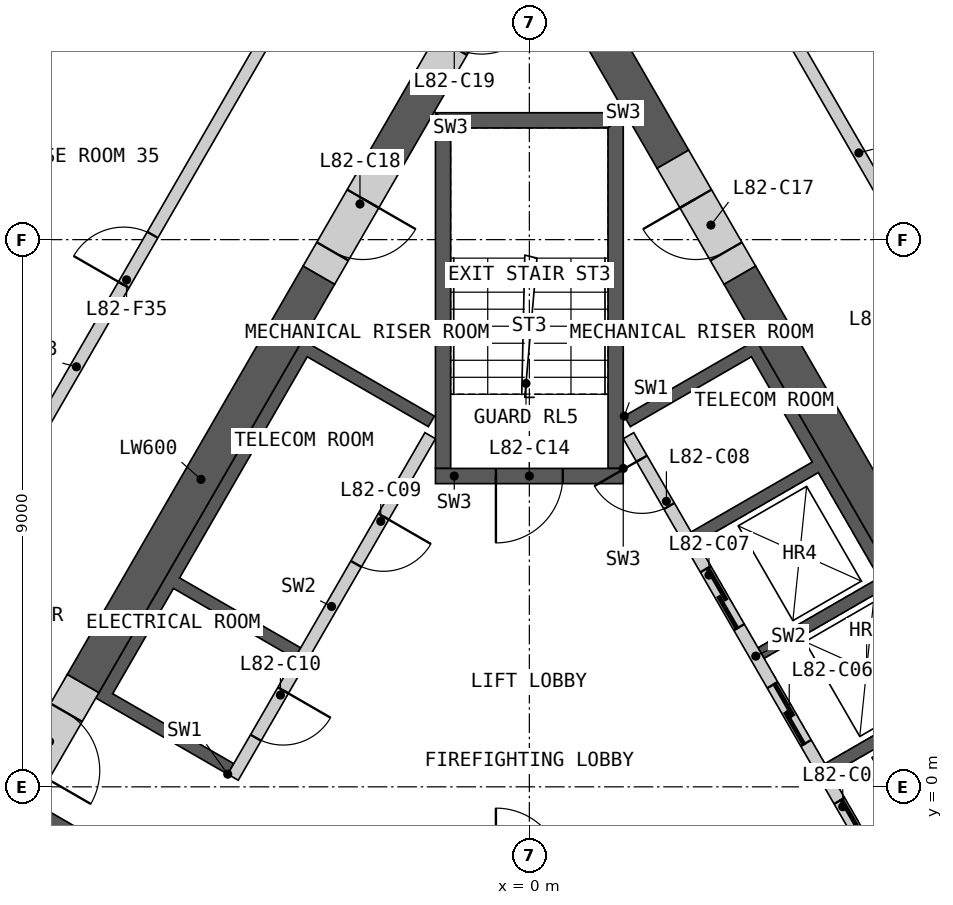
"""IFC4 building model, lengths in metres.
Left out: names, types, materials, properties, quantities, classifications, styles, units other than length and angle.
Written with IfcOpenShell. Run it as: python <this file> out.ifc"""

import sys

from ifc_helpers import new_model, si_unit, direction, frame, frame_2d, origin, place, context, subcontext, project, spatial, polyline, rectangle, outline, extrude, element, fill, save


model = new_model("IFC4")
c1 = context("Model", 3, precision=1e-05, world=origin(), true_north=direction((0.0, 1.0)))
c2 = subcontext(c1, "Body", "Model", "MODEL_VIEW")
j1 = project(units=[si_unit("LENGTHUNIT", "METRE"), si_unit("PLANEANGLEUNIT", "RADIAN")], contexts=[c1])
p1 = place(None, origin())
s1 = spatial("IfcSite", under=j1, at=p1, CompositionType="ELEMENT")
p2 = place(p1, origin())
s2 = spatial("IfcBuilding", under=s1, at=p2, CompositionType="ELEMENT")
p3 = place(p2, frame((0.0, 0.0, 367.8)))
s3 = spatial("IfcBuildingStorey", under=s2, at=p3, CompositionType="ELEMENT", Elevation=367.8)
p4 = place(p3, origin())
e1 = element("IfcWall", 1, at=p4, inside=s3, PredefinedType="SHEAR", context=c2, shape_type="SweptSolid", body=[
    extrude(outline(polyline([(1.561, 6.097), (3.731, 7.35), (8.231, -0.444), (6.061, -1.697), (5.96, -1.524), (7.952, -0.374), (6.952, 1.358), (4.96, 0.208), (4.861, 0.381), (6.852, 1.531), (5.852, 3.263), (3.861, 2.113), (3.76, 2.287), (5.752, 3.437), (4.752, 5.169), (2.76, 4.019), (2.66, 4.192), (4.652, 5.342), (3.652, 7.074), (1.66, 5.924), (1.561, 6.097)])), origin(), (0.0, 0.0, 1.0), 3.1),
])
p5 = place(p3, frame((5.817, -1.476, 0.0), z_axis=(0.0, 0.0, 1.0), x_axis=(-0.500002616675, 0.866023893041, 0.0)))
e2 = element("IfcWall", 2, at=p5, inside=s3, PredefinedType="SOLIDWALL", context=c2, shape_type="SweptSolid", body=[
    extrude(rectangle(XDim=8.373, YDim=0.2, at=frame_2d((4.187, 0.0))), origin(), (0.0, 0.0, 1.0), 3.1),
])
p6 = place(p5, frame((0.337, 0.0, 0.0)))
e3 = element("IfcOpeningElement", 3, at=p6, cuts=e2, PredefinedType="OPENING", context=c2, shape_type="SweptSolid", body=[
    extrude(rectangle(XDim=1.1, YDim=2.1, at=frame_2d((0.55, 1.05))), frame((0.0, 0.11, 0.0), z_axis=(0.0, -1.0, 0.0), x_axis=(1.0, 0.0, 0.0)), (0.0, 0.0, 1.0), 0.22),
])
p7 = place(p5, frame((2.537, 0.0, 0.0)))
e4 = element("IfcOpeningElement", 4, at=p7, cuts=e2, PredefinedType="OPENING", context=c2, shape_type="SweptSolid", body=[
    extrude(rectangle(XDim=1.1, YDim=2.1, at=frame_2d((0.55, 1.05))), frame((0.0, 0.11, 0.0), z_axis=(0.0, -1.0, 0.0), x_axis=(1.0, 0.0, 0.0)), (0.0, 0.0, 1.0), 0.22),
])
p8 = place(p5, frame((4.737, 0.0, 0.0)))
e5 = element("IfcOpeningElement", 5, at=p8, cuts=e2, PredefinedType="OPENING", context=c2, shape_type="SweptSolid", body=[
    extrude(rectangle(XDim=1.1, YDim=2.1, at=frame_2d((0.55, 1.05))), frame((0.0, 0.11, 0.0), z_axis=(0.0, -1.0, 0.0), x_axis=(1.0, 0.0, 0.0)), (0.0, 0.0, 1.0), 0.22),
])
p9 = place(p5, frame((7.037, 0.0, 0.0)))
e6 = element("IfcOpeningElement", 6, at=p9, cuts=e2, PredefinedType="OPENING", context=c2, shape_type="SweptSolid", body=[
    extrude(rectangle(XDim=0.9, YDim=2.1, at=frame_2d((0.45, 1.05))), frame((0.0, 0.11, 0.0), z_axis=(0.0, -1.0, 0.0), x_axis=(1.0, 0.0, 0.0)), (0.0, 0.0, 1.0), 0.22),
])
p10 = place(p3, origin())
e7 = element("IfcWall", 7, at=p10, inside=s3, PredefinedType="SHEAR", context=c2, shape_type="SweptSolid", body=[
    extrude(outline(polyline([(-6.061, -1.697), (-8.231, -0.444), (-8.131, -0.271), (-5.96, -1.524), (-6.061, -1.697)])), origin(), (0.0, 0.0, 1.0), 3.1),
])
p11 = place(p3, origin())
e8 = element("IfcWall", 8, at=p11, inside=s3, PredefinedType="SHEAR", context=c2, shape_type="SweptSolid", body=[
    extrude(outline(polyline([(-4.96, 0.208), (-7.131, 1.461), (-3.731, 7.35), (-1.561, 6.097), (-1.66, 5.924), (-3.652, 7.074), (-5.752, 3.437), (-3.76, 2.287), (-3.861, 2.113), (-5.852, 3.263), (-6.852, 1.531), (-4.861, 0.381), (-4.96, 0.208)])), origin(), (0.0, 0.0, 1.0), 3.1),
])
p12 = place(p3, frame((-1.631, 5.776, 0.0), z_axis=(0.0, 0.0, 1.0), x_axis=(-0.499992876559, -0.866029516466, 0.0)))
e9 = element("IfcWall", 9, at=p12, inside=s3, PredefinedType="SOLIDWALL", context=c2, shape_type="SweptSolid", body=[
    extrude(rectangle(XDim=6.486, YDim=0.2, at=frame_2d((3.243, 0.0))), origin(), (0.0, 0.0, 1.0), 3.1),
])
p13 = place(p12, frame((1.537, 0.0, 0.0)))
e10 = element("IfcOpeningElement", 10, at=p13, cuts=e9, PredefinedType="OPENING", context=c2, shape_type="SweptSolid", body=[
    extrude(rectangle(XDim=0.9, YDim=2.1, at=frame_2d((0.45, 1.05))), frame((0.0, 0.11, 0.0), z_axis=(0.0, -1.0, 0.0), x_axis=(1.0, 0.0, 0.0)), (0.0, 0.0, 1.0), 0.22),
])
p14 = place(p12, frame((4.837, 0.0, 0.0)))
e11 = element("IfcOpeningElement", 11, at=p14, cuts=e9, PredefinedType="OPENING", context=c2, shape_type="SweptSolid", body=[
    extrude(rectangle(XDim=0.9, YDim=2.1, at=frame_2d((0.45, 1.05))), frame((0.0, 0.11, 0.0), z_axis=(0.0, -1.0, 0.0), x_axis=(1.0, 0.0, 0.0)), (0.0, 0.0, 1.0), 0.22),
])
p15 = place(p3, origin())
e12 = element("IfcWall", 12, at=p15, inside=s3, PredefinedType="SHEAR", context=c2, shape_type="SweptSolid", body=[
    extrude(outline(polyline([(1.544, 5.237), (1.544, 11.087), (1.294, 10.837), (1.294, 5.237), (1.544, 5.237)])), origin(), (0.0, 0.0, 1.0), 3.1),
])
p16 = place(p3, origin())
e13 = element("IfcWall", 13, at=p16, inside=s3, PredefinedType="SHEAR", context=c2, shape_type="SweptSolid", body=[
    extrude(outline(polyline([(1.544, 11.087), (-1.544, 11.087), (-1.294, 10.837), (1.294, 10.837), (1.544, 11.087)])), origin(), (0.0, 0.0, 1.0), 3.1),
])
p17 = place(p3, origin())
e14 = element("IfcWall", 14, at=p17, inside=s3, PredefinedType="SHEAR", context=c2, shape_type="SweptSolid", body=[
    extrude(outline(polyline([(-1.294, 10.837), (-1.544, 11.087), (-1.544, 5.237), (-1.294, 5.237), (-1.294, 10.837)])), origin(), (0.0, 0.0, 1.0), 3.1),
])
p18 = place(p3, frame((1.544, 5.112, 0.0), z_axis=(0.0, 0.0, 1.0), x_axis=(-1.0, 0.0, 0.0)))
e15 = element("IfcWall", 15, at=p18, inside=s3, PredefinedType="SHEAR", context=c2, shape_type="SweptSolid", body=[
    extrude(rectangle(XDim=3.088, YDim=0.25, at=frame_2d((1.544, 0.0))), origin(), (0.0, 0.0, 1.0), 3.1),
])
p19 = place(p18, frame((0.994, 0.0, 0.0)))
e16 = element("IfcOpeningElement", 16, at=p19, cuts=e15, PredefinedType="OPENING", context=c2, shape_type="SweptSolid", body=[
    extrude(rectangle(XDim=1.1, YDim=2.1, at=frame_2d((0.55, 1.05))), frame((0.0, 0.135, 0.0), z_axis=(0.0, -1.0, 0.0), x_axis=(1.0, 0.0, 0.0)), (0.0, 0.0, 1.0), 0.27),
])
p20 = place(p3, frame((8.686, -0.634, 0.0), z_axis=(0.0, 0.0, 1.0), x_axis=(-0.50001836461, 0.866014800712, 0.0)))
e17 = element("IfcWall", 17, at=p20, inside=s3, PredefinedType="SHEAR", context=c2, shape_type="SweptSolid", body=[
    extrude(rectangle(XDim=10.451, YDim=0.6, at=frame_2d((5.225, 0.0))), origin(), (0.0, 0.0, 1.0), 3.1),
])
p21 = place(p3, frame((2.361, 10.322, 0.0), z_axis=(0.0, 0.0, 1.0), x_axis=(-0.500000735859, 0.866024978935, 0.0)))
e18 = element("IfcWall", 18, at=p21, inside=s3, PredefinedType="SHEAR", context=c2, shape_type="SweptSolid", body=[
    extrude(rectangle(XDim=4.202, YDim=0.6, at=frame_2d((2.101, 0.0))), origin(), (0.0, 0.0, 1.0), 3.1),
])
p22 = place(p3, frame((-3.461, 8.417, 0.0), z_axis=(0.0, 0.0, 1.0), x_axis=(-0.50000391502, -0.866023143435, 0.0)))
e19 = element("IfcWall", 19, at=p22, inside=s3, PredefinedType="SHEAR", context=c2, shape_type="SweptSolid", body=[
    extrude(rectangle(XDim=7.759, YDim=0.6, at=frame_2d((3.879, 0.0))), origin(), (0.0, 0.0, 1.0), 3.1),
])
p23 = place(p3, frame((-1.59, 11.658, 0.0), z_axis=(0.0, 0.0, 1.0), x_axis=(-0.500037594623, -0.866003697431, 0.0)))
e20 = element("IfcWall", 20, at=p23, inside=s3, PredefinedType="SHEAR", context=c2, shape_type="SweptSolid", body=[
    extrude(rectangle(XDim=1.542, YDim=0.6, at=frame_2d((0.771, 0.0))), origin(), (0.0, 0.0, 1.0), 3.1),
])
p24 = place(p3, frame((3.461, 8.417, 0.0), z_axis=(0.0, 0.0, 1.0), x_axis=(-0.499946605688, 0.86605622881, 0.0)))
e21 = element("IfcWall", 21, at=p24, inside=s3, PredefinedType="SHEAR", context=c2, shape_type="SweptSolid", body=[
    extrude(rectangle(XDim=2.2, YDim=0.6, at=frame_2d((1.1, 0.0))), origin(), (0.0, 0.0, 1.0), 3.1),
])
p25 = place(p24, frame((0.45, 0.0, 0.0)))
e22 = element("IfcOpeningElement", 22, at=p25, cuts=e21, PredefinedType="OPENING", context=c2, shape_type="SweptSolid", body=[
    extrude(rectangle(XDim=1.0, YDim=2.1, at=frame_2d((0.5, 1.05))), frame((0.0, 0.31, 0.0), z_axis=(0.0, -1.0, 0.0), x_axis=(1.0, 0.0, 0.0)), (0.0, 0.0, 1.0), 0.62),
])
p26 = place(p3, frame((-2.361, 10.322, 0.0), z_axis=(0.0, 0.0, 1.0), x_axis=(-0.499946605688, -0.86605622881, 0.0)))
e23 = element("IfcWall", 23, at=p26, inside=s3, PredefinedType="SHEAR", context=c2, shape_type="SweptSolid", body=[
    extrude(rectangle(XDim=2.2, YDim=0.6, at=frame_2d((1.1, 0.0))), origin(), (0.0, 0.0, 1.0), 3.1),
])
p27 = place(p26, frame((0.75, 0.0, 0.0)))
e24 = element("IfcOpeningElement", 24, at=p27, cuts=e23, PredefinedType="OPENING", context=c2, shape_type="SweptSolid", body=[
    extrude(rectangle(XDim=1.0, YDim=2.1, at=frame_2d((0.5, 1.05))), frame((0.0, 0.31, 0.0), z_axis=(0.0, -1.0, 0.0), x_axis=(1.0, 0.0, 0.0)), (0.0, 0.0, 1.0), 0.62),
])
p28 = place(p3, frame((-0.26, 13.961, 0.0), z_axis=(0.0, 0.0, 1.0), x_axis=(-0.49997936161, -0.866037319036, 0.0)))
e25 = element("IfcWall", 25, at=p28, inside=s3, PredefinedType="SHEAR", context=c2, shape_type="SweptSolid", body=[
    extrude(rectangle(XDim=2.66, YDim=0.6, at=frame_2d((1.33, 0.0))), origin(), (0.0, 0.0, 1.0), 3.1),
])
p29 = place(p28, frame((1.05, 0.0, 0.0)))
e26 = element("IfcOpeningElement", 26, at=p29, cuts=e25, PredefinedType="OPENING", context=c2, shape_type="SweptSolid", body=[
    extrude(rectangle(XDim=1.0, YDim=2.1, at=frame_2d((0.5, 1.05))), frame((0.0, 0.31, 0.0), z_axis=(0.0, -1.0, 0.0), x_axis=(1.0, 0.0, 0.0)), (0.0, 0.0, 1.0), 0.62),
])
p30 = place(p3, frame((-7.34, 1.698, 0.0), z_axis=(0.0, 0.0, 1.0), x_axis=(-0.50002983664, -0.866008176907, 0.0)))
e27 = element("IfcWall", 27, at=p30, inside=s3, PredefinedType="SHEAR", context=c2, shape_type="SweptSolid", body=[
    extrude(rectangle(XDim=2.2, YDim=0.6, at=frame_2d((1.1, 0.0))), origin(), (0.0, 0.0, 1.0), 3.1),
])
p31 = place(p30, frame((0.55, 0.0, 0.0)))
e28 = element("IfcOpeningElement", 28, at=p31, cuts=e27, PredefinedType="OPENING", context=c2, shape_type="SweptSolid", body=[
    extrude(rectangle(XDim=1.1, YDim=2.1, at=frame_2d((0.55, 1.05))), frame((0.0, 0.31, 0.0), z_axis=(0.0, -1.0, 0.0), x_axis=(1.0, 0.0, 0.0)), (0.0, 0.0, 1.0), 0.62),
])
p32 = place(p3, frame((-8.465, 5.15, 0.0), z_axis=(0.0, 0.0, 1.0), x_axis=(0.499992155518, 0.866029932751, 0.0)))
e29 = element("IfcWall", 29, at=p32, inside=s3, PredefinedType="PARTITIONING", context=c2, shape_type="SweptSolid", body=[
    extrude(rectangle(XDim=8.123, YDim=0.2, at=frame_2d((4.062, 0.0))), origin(), (0.0, 0.0, 1.0), 3.1),
])
p33 = place(p32, frame((3.587, 0.0, 0.0)))
e30 = element("IfcOpeningElement", 30, at=p33, cuts=e29, PredefinedType="OPENING", context=c2, shape_type="SweptSolid", body=[
    extrude(rectangle(XDim=0.95, YDim=2.1, at=frame_2d((0.475, 1.05))), frame((0.0, 0.11, 0.0), z_axis=(0.0, -1.0, 0.0), x_axis=(1.0, 0.0, 0.0)), (0.0, 0.0, 1.0), 0.22),
])
p34 = place(p3, frame((4.403, 12.185, 0.0), z_axis=(0.0, 0.0, 1.0), x_axis=(0.499992155518, -0.866029932751, 0.0)))
e31 = element("IfcWall", 31, at=p34, inside=s3, PredefinedType="PARTITIONING", context=c2, shape_type="SweptSolid", body=[
    extrude(rectangle(XDim=8.123, YDim=0.2, at=frame_2d((4.062, 0.0))), origin(), (0.0, 0.0, 1.0), 3.1),
])
p35 = place(p34, frame((3.762, 0.0, 0.0)))
e32 = element("IfcOpeningElement", 32, at=p35, cuts=e31, PredefinedType="OPENING", context=c2, shape_type="SweptSolid", body=[
    extrude(rectangle(XDim=1.0, YDim=2.1, at=frame_2d((0.5, 1.05))), frame((0.0, 0.11, 0.0), z_axis=(0.0, -1.0, 0.0), x_axis=(1.0, 0.0, 0.0)), (0.0, 0.0, 1.0), 0.22),
])
p36 = place(p3, frame((-11.473, 6.74, 0.0), z_axis=(0.0, 0.0, 1.0), x_axis=(0.499993542657, 0.866029131901, 0.0)))
e33 = element("IfcWall", 33, at=p36, inside=s3, PredefinedType="PARTITIONING", context=c2, shape_type="SweptSolid", body=[
    extrude(rectangle(XDim=14.994, YDim=0.2, at=frame_2d((7.497, 0.0))), origin(), (0.0, 0.0, 1.0), 2.33),
])
p37 = place(p36, frame((10.383, 0.0, 0.0)))
e34 = element("IfcOpeningElement", 34, at=p37, cuts=e33, PredefinedType="OPENING", context=c2, shape_type="SweptSolid", body=[
    extrude(rectangle(XDim=0.95, YDim=2.1, at=frame_2d((0.475, 1.05))), frame((0.0, 0.11, 0.0), z_axis=(0.0, -1.0, 0.0), x_axis=(1.0, 0.0, 0.0)), (0.0, 0.0, 1.0), 0.22),
])
p38 = place(p6, origin())
e35 = element("IfcDoor", 35, at=p38, inside=s3, OperationType="SLIDING_TO_LEFT", PredefinedType="DOOR", context=c2, shape_type="SweptSolid", body=[
    extrude(rectangle(XDim=1.1, YDim=2.1, at=frame_2d((0.55, 1.05))), frame((0.0, 0.025, 0.0), z_axis=(0.0, -1.0, 0.0), x_axis=(1.0, 0.0, 0.0)), (0.0, 0.0, 1.0), 0.05),
])
fill(e3, e35)
p39 = place(p7, origin())
e36 = element("IfcDoor", 36, at=p39, inside=s3, OperationType="SLIDING_TO_LEFT", PredefinedType="DOOR", context=c2, shape_type="SweptSolid", body=[
    extrude(rectangle(XDim=1.1, YDim=2.1, at=frame_2d((0.55, 1.05))), frame((0.0, 0.025, 0.0), z_axis=(0.0, -1.0, 0.0), x_axis=(1.0, 0.0, 0.0)), (0.0, 0.0, 1.0), 0.05),
])
fill(e4, e36)
p40 = place(p8, origin())
e37 = element("IfcDoor", 37, at=p40, inside=s3, OperationType="SLIDING_TO_LEFT", PredefinedType="DOOR", context=c2, shape_type="SweptSolid", body=[
    extrude(rectangle(XDim=1.1, YDim=2.1, at=frame_2d((0.55, 1.05))), frame((0.0, 0.025, 0.0), z_axis=(0.0, -1.0, 0.0), x_axis=(1.0, 0.0, 0.0)), (0.0, 0.0, 1.0), 0.05),
])
fill(e5, e37)
p41 = place(p9, origin())
e38 = element("IfcDoor", 38, at=p41, inside=s3, OperationType="SINGLE_SWING_RIGHT", PredefinedType="DOOR", context=c2, shape_type="SweptSolid", body=[
    extrude(rectangle(XDim=0.9, YDim=2.1, at=frame_2d((0.45, 1.05))), frame((0.0, 0.025, 0.0), z_axis=(0.0, -1.0, 0.0), x_axis=(1.0, 0.0, 0.0)), (0.0, 0.0, 1.0), 0.05),
])
fill(e6, e38)
p42 = place(p13, origin())
e39 = element("IfcDoor", 39, at=p42, inside=s3, OperationType="SINGLE_SWING_LEFT", PredefinedType="DOOR", context=c2, shape_type="SweptSolid", body=[
    extrude(rectangle(XDim=0.9, YDim=2.1, at=frame_2d((0.45, 1.05))), frame((0.0, 0.025, 0.0), z_axis=(0.0, -1.0, 0.0), x_axis=(1.0, 0.0, 0.0)), (0.0, 0.0, 1.0), 0.05),
])
fill(e10, e39)
p43 = place(p14, origin())
e40 = element("IfcDoor", 40, at=p43, inside=s3, OperationType="SINGLE_SWING_LEFT", PredefinedType="DOOR", context=c2, shape_type="SweptSolid", body=[
    extrude(rectangle(XDim=0.9, YDim=2.1, at=frame_2d((0.45, 1.05))), frame((0.0, 0.025, 0.0), z_axis=(0.0, -1.0, 0.0), x_axis=(1.0, 0.0, 0.0)), (0.0, 0.0, 1.0), 0.05),
])
fill(e11, e40)
p44 = place(p19, origin())
e41 = element("IfcDoor", 41, at=p44, inside=s3, OperationType="SINGLE_SWING_RIGHT", PredefinedType="DOOR", context=c2, shape_type="SweptSolid", body=[
    extrude(rectangle(XDim=1.1, YDim=2.1, at=frame_2d((0.55, 1.05))), frame((0.0, 0.025, 0.0), z_axis=(0.0, -1.0, 0.0), x_axis=(1.0, 0.0, 0.0)), (0.0, 0.0, 1.0), 0.05),
])
fill(e16, e41)
p45 = place(p25, origin())
e42 = element("IfcDoor", 42, at=p45, inside=s3, OperationType="SINGLE_SWING_RIGHT", PredefinedType="DOOR", context=c2, shape_type="SweptSolid", body=[
    extrude(rectangle(XDim=1.0, YDim=2.1, at=frame_2d((0.5, 1.05))), frame((0.0, 0.055, 0.0), z_axis=(0.0, -1.0, 0.0), x_axis=(1.0, 0.0, 0.0)), (0.0, 0.0, 1.0), 0.05),
])
fill(e22, e42)
p46 = place(p27, origin())
e43 = element("IfcDoor", 43, at=p46, inside=s3, OperationType="SINGLE_SWING_LEFT", PredefinedType="DOOR", context=c2, shape_type="SweptSolid", body=[
    extrude(rectangle(XDim=1.0, YDim=2.1, at=frame_2d((0.5, 1.05))), frame((0.0, 0.055, 0.0), z_axis=(0.0, -1.0, 0.0), x_axis=(1.0, 0.0, 0.0)), (0.0, 0.0, 1.0), 0.05),
])
fill(e24, e43)
p47 = place(p31, origin())
e44 = element("IfcDoor", 44, at=p47, inside=s3, OperationType="SINGLE_SWING_RIGHT", PredefinedType="DOOR", context=c2, shape_type="SweptSolid", body=[
    extrude(rectangle(XDim=1.1, YDim=2.1, at=frame_2d((0.55, 1.05))), frame((0.0, 0.055, 0.0), z_axis=(0.0, -1.0, 0.0), x_axis=(1.0, 0.0, 0.0)), (0.0, 0.0, 1.0), 0.05),
])
fill(e28, e44)
p48 = place(p33, origin())
e45 = element("IfcDoor", 45, at=p48, inside=s3, OperationType="SINGLE_SWING_LEFT", PredefinedType="DOOR", context=c2, shape_type="SweptSolid", body=[
    extrude(rectangle(XDim=0.95, YDim=2.1, at=frame_2d((0.475, 1.05))), frame((0.0, 0.025, 0.0), z_axis=(0.0, -1.0, 0.0), x_axis=(1.0, 0.0, 0.0)), (0.0, 0.0, 1.0), 0.05),
])
fill(e30, e45)
save(model, sys.argv[1])
